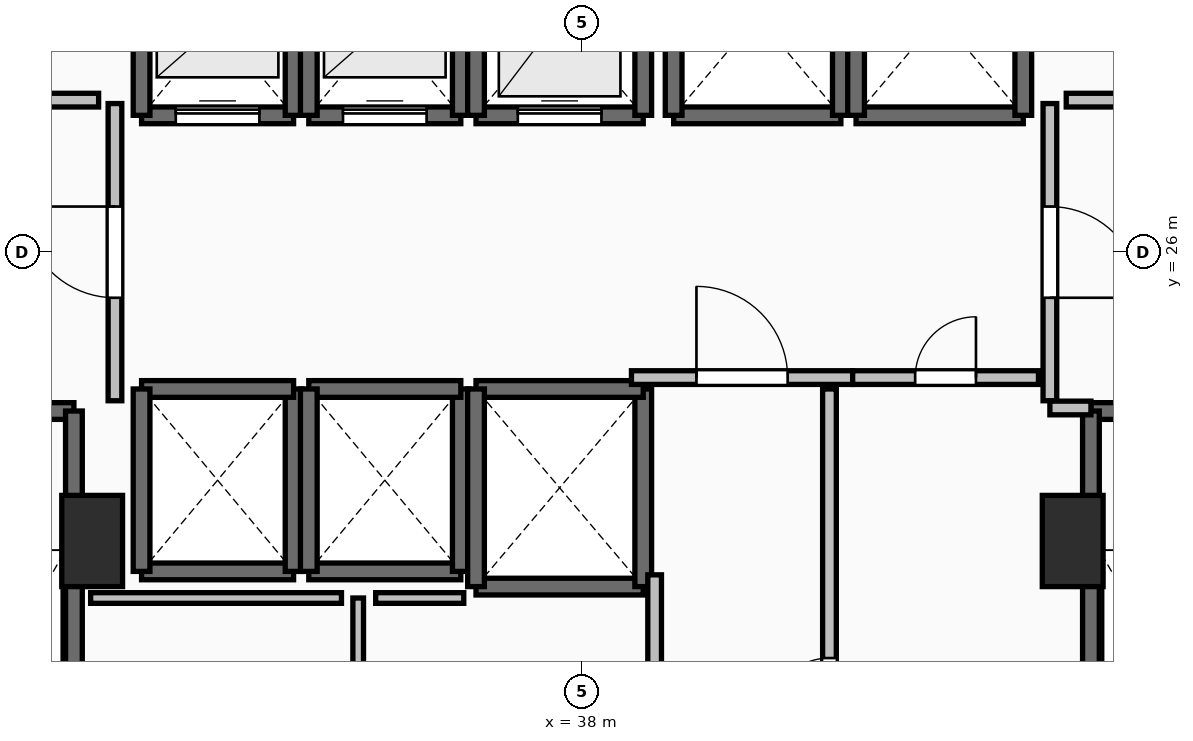
"""IFC4 building model, lengths in metres.
Left out: names, types, materials, properties, quantities, classifications, styles, units other than length and angle.
Written with IfcOpenShell. Run it as: python <this file> out.ifc"""

import sys

from ifc_helpers import new_model, si_unit, direction, frame, frame_2d, origin, origin_2d, place, context, subcontext, project, spatial, rectangle, extrude, element, fill, save


model = new_model("IFC4")
c1 = context("Model", 3, precision=1e-05, world=origin(), true_north=direction((0.0, 1.0)))
c2 = subcontext(c1, "Body", "Model", "MODEL_VIEW")
j1 = project(units=[si_unit("LENGTHUNIT", "METRE"), si_unit("PLANEANGLEUNIT", "RADIAN")], contexts=[c1])
p1 = place(None, origin())
s1 = spatial("IfcSite", under=j1, at=p1, CompositionType="ELEMENT")
p2 = place(p1, origin())
s2 = spatial("IfcBuilding", under=s1, at=p2, CompositionType="ELEMENT")
p3 = place(p2, frame((0.0, 0.0, 27.5)))
s3 = spatial("IfcBuildingStorey", under=s2, at=p3, CompositionType="ELEMENT", Elevation=27.5)
for number, where, z_axis, x_axis in (
    (1, (31.55, 22.2, 0.0), (0.0, 0.0, 1.0), (1.0, 0.0, 0.0)),
    (2, (44.45, 22.2, 0.0), (0.0, 0.0, 1.0), (1.0, 0.0, 0.0)),
):
    element("IfcColumn", number, at=place(p3, frame(where, z_axis=z_axis, x_axis=x_axis)), inside=s3, PredefinedType="PILASTER", context=c2, shape_type="SweptSolid", body=[
        extrude(rectangle(XDim=0.8, YDim=1.2, at=origin_2d()), origin(), (0.0, 0.0, 1.0), 3.5),
    ])
p4 = place(p3, frame((27.94, 23.91, 0.0), z_axis=(0.0, 0.0, 1.0), x_axis=(1.0, 0.0, 0.0)))
e3 = element("IfcWall", 3, at=p4, inside=s3, PredefinedType="SOLIDWALL", context=c2, shape_type="SweptSolid", body=[
    extrude(rectangle(XDim=3.37, YDim=0.22, at=frame_2d((1.685, 0.0))), origin(), (0.0, 0.0, 1.0), 3.24),
])
p5 = place(p4, frame((1.135, 0.0, 0.0)))
e4 = element("IfcOpeningElement", 4, at=p5, cuts=e3, PredefinedType="OPENING", context=c2, shape_type="SweptSolid", body=[
    extrude(rectangle(XDim=1.1, YDim=2.15, at=frame_2d((0.55, 1.075))), frame((0.0, 0.125, 0.0), z_axis=(0.0, -1.0, 0.0), x_axis=(1.0, 0.0, 0.0)), (0.0, 0.0, 1.0), 0.25),
])
p6 = place(p3, frame((31.31, 23.91, 0.0), z_axis=(0.0, 0.0, 1.0), x_axis=(0.0, -1.0, 0.0)))
e5 = element("IfcWall", 5, at=p6, inside=s3, PredefinedType="SOLIDWALL", context=c2, shape_type="SweptSolid", body=[
    extrude(rectangle(XDim=7.42, YDim=0.22, at=frame_2d((3.71, 0.0))), origin(), (0.0, 0.0, 1.0), 3.24),
])
p7 = place(p3, frame((44.69, 23.91, 0.0), z_axis=(0.0, 0.0, 1.0), x_axis=(1.0, 0.0, 0.0)))
e6 = element("IfcWall", 6, at=p7, inside=s3, PredefinedType="SOLIDWALL", context=c2, shape_type="SweptSolid", body=[
    extrude(rectangle(XDim=3.37, YDim=0.22, at=frame_2d((1.685, 0.0))), origin(), (0.0, 0.0, 1.0), 3.24),
])
p8 = place(p7, frame((1.135, 0.0, 0.0)))
e7 = element("IfcOpeningElement", 7, at=p8, cuts=e6, PredefinedType="OPENING", context=c2, shape_type="SweptSolid", body=[
    extrude(rectangle(XDim=1.1, YDim=2.15, at=frame_2d((0.55, 1.075))), frame((0.0, 0.125, 0.0), z_axis=(0.0, -1.0, 0.0), x_axis=(1.0, 0.0, 0.0)), (0.0, 0.0, 1.0), 0.25),
])
p9 = place(p3, frame((44.69, 16.49, 0.0), z_axis=(0.0, 0.0, 1.0), x_axis=(0.0, 1.0, 0.0)))
e8 = element("IfcWall", 8, at=p9, inside=s3, PredefinedType="SOLIDWALL", context=c2, shape_type="SweptSolid", body=[
    extrude(rectangle(XDim=7.42, YDim=0.22, at=frame_2d((3.71, 0.0))), origin(), (0.0, 0.0, 1.0), 3.24),
])
p10 = place(p3, frame((32.2, 27.8, 0.0), z_axis=(0.0, 0.0, 1.0), x_axis=(1.0, 0.0, 0.0)))
e9 = element("IfcWall", 9, at=p10, inside=s3, PredefinedType="SOLIDWALL", context=c2, shape_type="SweptSolid", body=[
    extrude(rectangle(XDim=2.0, YDim=0.22, at=frame_2d((1.0, 0.0))), origin(), (0.0, 0.0, 1.0), 3.24),
])
p11 = place(p10, frame((0.45, 0.0, 0.0)))
e10 = element("IfcOpeningElement", 10, at=p11, cuts=e9, PredefinedType="OPENING", context=c2, shape_type="SweptSolid", body=[
    extrude(rectangle(XDim=1.1, YDim=2.2, at=frame_2d((0.55, 1.1))), frame((0.0, 0.125, 0.0), z_axis=(0.0, -1.0, 0.0), x_axis=(1.0, 0.0, 0.0)), (0.0, 0.0, 1.0), 0.25),
])
for number, where, z_axis, x_axis in (
    (11, (34.2, 27.8, 0.0), (0.0, 0.0, 1.0), (0.0, 1.0, 0.0)),
    (12, (32.2, 30.2, 0.0), (0.0, 0.0, 1.0), (0.0, -1.0, 0.0)),
):
    element("IfcWall", number, at=place(p3, frame(where, z_axis=z_axis, x_axis=x_axis)), inside=s3, PredefinedType="SOLIDWALL", context=c2, shape_type="SweptSolid", body=[
        extrude(rectangle(XDim=2.4, YDim=0.22, at=frame_2d((1.2, 0.0))), origin(), (0.0, 0.0, 1.0), 3.24),
    ])
p12 = place(p3, frame((34.4, 27.8, 0.0), z_axis=(0.0, 0.0, 1.0), x_axis=(1.0, 0.0, 0.0)))
e13 = element("IfcWall", 13, at=p12, inside=s3, PredefinedType="SOLIDWALL", context=c2, shape_type="SweptSolid", body=[
    extrude(rectangle(XDim=2.0, YDim=0.22, at=frame_2d((1.0, 0.0))), origin(), (0.0, 0.0, 1.0), 3.24),
])
p13 = place(p12, frame((0.45, 0.0, 0.0)))
e14 = element("IfcOpeningElement", 14, at=p13, cuts=e13, PredefinedType="OPENING", context=c2, shape_type="SweptSolid", body=[
    extrude(rectangle(XDim=1.1, YDim=2.2, at=frame_2d((0.55, 1.1))), frame((0.0, 0.125, 0.0), z_axis=(0.0, -1.0, 0.0), x_axis=(1.0, 0.0, 0.0)), (0.0, 0.0, 1.0), 0.25),
])
for number, where, z_axis, x_axis in (
    (15, (36.4, 27.8, 0.0), (0.0, 0.0, 1.0), (0.0, 1.0, 0.0)),
    (16, (34.4, 30.2, 0.0), (0.0, 0.0, 1.0), (0.0, -1.0, 0.0)),
):
    element("IfcWall", number, at=place(p3, frame(where, z_axis=z_axis, x_axis=x_axis)), inside=s3, PredefinedType="SOLIDWALL", context=c2, shape_type="SweptSolid", body=[
        extrude(rectangle(XDim=2.4, YDim=0.22, at=frame_2d((1.2, 0.0))), origin(), (0.0, 0.0, 1.0), 3.24),
    ])
p14 = place(p3, frame((36.6, 27.8, 0.0), z_axis=(0.0, 0.0, 1.0), x_axis=(1.0, 0.0, 0.0)))
e17 = element("IfcWall", 17, at=p14, inside=s3, PredefinedType="SOLIDWALL", context=c2, shape_type="SweptSolid", body=[
    extrude(rectangle(XDim=2.2, YDim=0.22, at=frame_2d((1.1, 0.0))), origin(), (0.0, 0.0, 1.0), 3.24),
])
p15 = place(p14, frame((0.55, 0.0, 0.0)))
e18 = element("IfcOpeningElement", 18, at=p15, cuts=e17, PredefinedType="OPENING", context=c2, shape_type="SweptSolid", body=[
    extrude(rectangle(XDim=1.1, YDim=2.2, at=frame_2d((0.55, 1.1))), frame((0.0, 0.125, 0.0), z_axis=(0.0, -1.0, 0.0), x_axis=(1.0, 0.0, 0.0)), (0.0, 0.0, 1.0), 0.25),
])
for number, where, z_axis, x_axis in (
    (19, (38.8, 27.8, 0.0), (0.0, 0.0, 1.0), (0.0, 1.0, 0.0)),
    (20, (36.6, 30.4, 0.0), (0.0, 0.0, 1.0), (0.0, -1.0, 0.0)),
):
    element("IfcWall", number, at=place(p3, frame(where, z_axis=z_axis, x_axis=x_axis)), inside=s3, PredefinedType="SOLIDWALL", context=c2, shape_type="SweptSolid", body=[
        extrude(rectangle(XDim=2.6, YDim=0.22, at=frame_2d((1.3, 0.0))), origin(), (0.0, 0.0, 1.0), 3.24),
    ])
p16 = place(p3, frame((32.2, 21.8, 0.0), z_axis=(0.0, 0.0, 1.0), x_axis=(1.0, 0.0, 0.0)))
e21 = element("IfcWall", 21, at=p16, inside=s3, PredefinedType="SOLIDWALL", context=c2, shape_type="SweptSolid", body=[
    extrude(rectangle(XDim=2.0, YDim=0.22, at=frame_2d((1.0, 0.0))), origin(), (0.0, 0.0, 1.0), 3.24),
])
p17 = place(p3, frame((34.2, 21.8, 0.0), z_axis=(0.0, 0.0, 1.0), x_axis=(0.0, 1.0, 0.0)))
e22 = element("IfcWall", 22, at=p17, inside=s3, PredefinedType="SOLIDWALL", context=c2, shape_type="SweptSolid", body=[
    extrude(rectangle(XDim=2.4, YDim=0.22, at=frame_2d((1.2, 0.0))), origin(), (0.0, 0.0, 1.0), 3.24),
])
p18 = place(p3, frame((34.2, 24.2, 0.0), z_axis=(0.0, 0.0, 1.0), x_axis=(-1.0, 0.0, 0.0)))
e23 = element("IfcWall", 23, at=p18, inside=s3, PredefinedType="SOLIDWALL", context=c2, shape_type="SweptSolid", body=[
    extrude(rectangle(XDim=2.0, YDim=0.22, at=frame_2d((1.0, 0.0))), origin(), (0.0, 0.0, 1.0), 3.24),
])
p19 = place(p3, frame((32.2, 24.2, 0.0), z_axis=(0.0, 0.0, 1.0), x_axis=(0.0, -1.0, 0.0)))
e24 = element("IfcWall", 24, at=p19, inside=s3, PredefinedType="SOLIDWALL", context=c2, shape_type="SweptSolid", body=[
    extrude(rectangle(XDim=2.4, YDim=0.22, at=frame_2d((1.2, 0.0))), origin(), (0.0, 0.0, 1.0), 3.24),
])
p20 = place(p3, frame((34.4, 21.8, 0.0), z_axis=(0.0, 0.0, 1.0), x_axis=(1.0, 0.0, 0.0)))
e25 = element("IfcWall", 25, at=p20, inside=s3, PredefinedType="SOLIDWALL", context=c2, shape_type="SweptSolid", body=[
    extrude(rectangle(XDim=2.0, YDim=0.22, at=frame_2d((1.0, 0.0))), origin(), (0.0, 0.0, 1.0), 3.24),
])
p21 = place(p3, frame((36.4, 21.8, 0.0), z_axis=(0.0, 0.0, 1.0), x_axis=(0.0, 1.0, 0.0)))
e26 = element("IfcWall", 26, at=p21, inside=s3, PredefinedType="SOLIDWALL", context=c2, shape_type="SweptSolid", body=[
    extrude(rectangle(XDim=2.4, YDim=0.22, at=frame_2d((1.2, 0.0))), origin(), (0.0, 0.0, 1.0), 3.24),
])
p22 = place(p3, frame((36.4, 24.2, 0.0), z_axis=(0.0, 0.0, 1.0), x_axis=(-1.0, 0.0, 0.0)))
e27 = element("IfcWall", 27, at=p22, inside=s3, PredefinedType="SOLIDWALL", context=c2, shape_type="SweptSolid", body=[
    extrude(rectangle(XDim=2.0, YDim=0.22, at=frame_2d((1.0, 0.0))), origin(), (0.0, 0.0, 1.0), 3.24),
])
p23 = place(p3, frame((34.4, 24.2, 0.0), z_axis=(0.0, 0.0, 1.0), x_axis=(0.0, -1.0, 0.0)))
e28 = element("IfcWall", 28, at=p23, inside=s3, PredefinedType="SOLIDWALL", context=c2, shape_type="SweptSolid", body=[
    extrude(rectangle(XDim=2.4, YDim=0.22, at=frame_2d((1.2, 0.0))), origin(), (0.0, 0.0, 1.0), 3.24),
])
p24 = place(p3, frame((36.6, 21.6, 0.0), z_axis=(0.0, 0.0, 1.0), x_axis=(1.0, 0.0, 0.0)))
e29 = element("IfcWall", 29, at=p24, inside=s3, PredefinedType="SOLIDWALL", context=c2, shape_type="SweptSolid", body=[
    extrude(rectangle(XDim=2.2, YDim=0.22, at=frame_2d((1.1, 0.0))), origin(), (0.0, 0.0, 1.0), 3.24),
])
p25 = place(p3, frame((38.8, 21.6, 0.0), z_axis=(0.0, 0.0, 1.0), x_axis=(0.0, 1.0, 0.0)))
e30 = element("IfcWall", 30, at=p25, inside=s3, PredefinedType="SOLIDWALL", context=c2, shape_type="SweptSolid", body=[
    extrude(rectangle(XDim=2.6, YDim=0.22, at=frame_2d((1.3, 0.0))), origin(), (0.0, 0.0, 1.0), 3.24),
])
p26 = place(p3, frame((38.8, 24.2, 0.0), z_axis=(0.0, 0.0, 1.0), x_axis=(-1.0, 0.0, 0.0)))
e31 = element("IfcWall", 31, at=p26, inside=s3, PredefinedType="SOLIDWALL", context=c2, shape_type="SweptSolid", body=[
    extrude(rectangle(XDim=2.2, YDim=0.22, at=frame_2d((1.1, 0.0))), origin(), (0.0, 0.0, 1.0), 3.24),
])
p27 = place(p3, frame((36.6, 24.2, 0.0), z_axis=(0.0, 0.0, 1.0), x_axis=(0.0, -1.0, 0.0)))
e32 = element("IfcWall", 32, at=p27, inside=s3, PredefinedType="SOLIDWALL", context=c2, shape_type="SweptSolid", body=[
    extrude(rectangle(XDim=2.6, YDim=0.22, at=frame_2d((1.3, 0.0))), origin(), (0.0, 0.0, 1.0), 3.24),
])
p28 = place(p3, frame((39.2, 27.8, 0.0), z_axis=(0.0, 0.0, 1.0), x_axis=(1.0, 0.0, 0.0)))
e33 = element("IfcWall", 33, at=p28, inside=s3, PredefinedType="SOLIDWALL", context=c2, shape_type="SweptSolid", body=[
    extrude(rectangle(XDim=2.2, YDim=0.22, at=frame_2d((1.1, 0.0))), origin(), (0.0, 0.0, 1.0), 3.24),
])
for number, where, z_axis, x_axis in (
    (34, (41.4, 27.8, 0.0), (0.0, 0.0, 1.0), (0.0, 1.0, 0.0)),
    (35, (39.2, 30.4, 0.0), (0.0, 0.0, 1.0), (0.0, -1.0, 0.0)),
):
    element("IfcWall", number, at=place(p3, frame(where, z_axis=z_axis, x_axis=x_axis)), inside=s3, PredefinedType="SOLIDWALL", context=c2, shape_type="SweptSolid", body=[
        extrude(rectangle(XDim=2.6, YDim=0.22, at=frame_2d((1.3, 0.0))), origin(), (0.0, 0.0, 1.0), 3.24),
    ])
p29 = place(p3, frame((41.6, 27.8, 0.0), z_axis=(0.0, 0.0, 1.0), x_axis=(1.0, 0.0, 0.0)))
e36 = element("IfcWall", 36, at=p29, inside=s3, PredefinedType="SOLIDWALL", context=c2, shape_type="SweptSolid", body=[
    extrude(rectangle(XDim=2.2, YDim=0.22, at=frame_2d((1.1, 0.0))), origin(), (0.0, 0.0, 1.0), 3.24),
])
for number, where, z_axis, x_axis in (
    (37, (43.8, 27.8, 0.0), (0.0, 0.0, 1.0), (0.0, 1.0, 0.0)),
    (38, (41.6, 30.4, 0.0), (0.0, 0.0, 1.0), (0.0, -1.0, 0.0)),
):
    element("IfcWall", number, at=place(p3, frame(where, z_axis=z_axis, x_axis=x_axis)), inside=s3, PredefinedType="SOLIDWALL", context=c2, shape_type="SweptSolid", body=[
        extrude(rectangle(XDim=2.6, YDim=0.22, at=frame_2d((1.3, 0.0))), origin(), (0.0, 0.0, 1.0), 3.24),
    ])
p30 = place(p3, frame((31.85, 24.045, 0.0), z_axis=(0.0, 0.0, 1.0), x_axis=(0.0, 1.0, 0.0)))
e39 = element("IfcWall", 39, at=p30, inside=s3, PredefinedType="PARTITIONING", context=c2, shape_type="SweptSolid", body=[
    extrude(rectangle(XDim=3.91, YDim=0.18, at=frame_2d((1.955, 0.0))), origin(), (0.0, 0.0, 1.0), 3.24),
])
p31 = place(p30, frame((1.355, 0.0, 0.0)))
e40 = element("IfcOpeningElement", 40, at=p31, cuts=e39, PredefinedType="OPENING", context=c2, shape_type="SweptSolid", body=[
    extrude(rectangle(XDim=1.2, YDim=2.15, at=frame_2d((0.6, 1.075))), frame((0.0, 0.105, 0.0), z_axis=(0.0, -1.0, 0.0), x_axis=(1.0, 0.0, 0.0)), (0.0, 0.0, 1.0), 0.21),
])
p32 = place(p3, frame((44.15, 27.955, 0.0), z_axis=(0.0, 0.0, 1.0), x_axis=(0.0, -1.0, 0.0)))
e41 = element("IfcWall", 41, at=p32, inside=s3, PredefinedType="PARTITIONING", context=c2, shape_type="SweptSolid", body=[
    extrude(rectangle(XDim=3.91, YDim=0.18, at=frame_2d((1.955, 0.0))), origin(), (0.0, 0.0, 1.0), 3.24),
])
p33 = place(p32, frame((1.355, 0.0, 0.0)))
e42 = element("IfcOpeningElement", 42, at=p33, cuts=e41, PredefinedType="OPENING", context=c2, shape_type="SweptSolid", body=[
    extrude(rectangle(XDim=1.2, YDim=2.15, at=frame_2d((0.6, 1.075))), frame((0.0, 0.105, 0.0), z_axis=(0.0, -1.0, 0.0), x_axis=(1.0, 0.0, 0.0)), (0.0, 0.0, 1.0), 0.21),
])
p34 = place(p3, frame((44.15, 23.95, 0.0), z_axis=(0.0, 0.0, 1.0), x_axis=(1.0, 0.0, 0.0)))
e43 = element("IfcWall", 43, at=p34, inside=s3, PredefinedType="PARTITIONING", context=c2, shape_type="SweptSolid", body=[
    extrude(rectangle(XDim=0.54, YDim=0.18, at=frame_2d((0.27, 0.0))), origin(), (0.0, 0.0, 1.0), 3.24),
])
p35 = place(p3, frame((38.645, 24.35, 0.0), z_axis=(0.0, 0.0, 1.0), x_axis=(1.0, 0.0, 0.0)))
e44 = element("IfcWall", 44, at=p35, inside=s3, PredefinedType="PARTITIONING", context=c2, shape_type="SweptSolid", body=[
    extrude(rectangle(XDim=2.91, YDim=0.18, at=frame_2d((1.455, 0.0))), origin(), (0.0, 0.0, 1.0), 3.24),
])
p36 = place(p35, frame((0.855, 0.0, 0.0)))
e45 = element("IfcOpeningElement", 45, at=p36, cuts=e44, PredefinedType="OPENING", context=c2, shape_type="SweptSolid", body=[
    extrude(rectangle(XDim=1.2, YDim=2.15, at=frame_2d((0.6, 1.075))), frame((0.0, 0.105, 0.0), z_axis=(0.0, -1.0, 0.0), x_axis=(1.0, 0.0, 0.0)), (0.0, 0.0, 1.0), 0.21),
])
p37 = place(p3, frame((41.555, 24.35, 0.0), z_axis=(0.0, 0.0, 1.0), x_axis=(1.0, 0.0, 0.0)))
e46 = element("IfcWall", 46, at=p37, inside=s3, PredefinedType="PARTITIONING", context=c2, shape_type="SweptSolid", body=[
    extrude(rectangle(XDim=2.445, YDim=0.18, at=frame_2d((1.223, 0.0))), origin(), (0.0, 0.0, 1.0), 3.24),
])
p38 = place(p37, frame((0.823, 0.0, 0.0)))
e47 = element("IfcOpeningElement", 47, at=p38, cuts=e46, PredefinedType="OPENING", context=c2, shape_type="SweptSolid", body=[
    extrude(rectangle(XDim=0.8, YDim=2.05, at=frame_2d((0.4, 1.025))), frame((0.0, 0.105, 0.0), z_axis=(0.0, -1.0, 0.0), x_axis=(1.0, 0.0, 0.0)), (0.0, 0.0, 1.0), 0.21),
])
p39 = place(p3, frame((41.25, 16.32, 0.0), z_axis=(0.0, 0.0, 1.0), x_axis=(0.0, 1.0, 0.0)))
e48 = element("IfcWall", 48, at=p39, inside=s3, PredefinedType="PARTITIONING", context=c2, shape_type="SweptSolid", body=[
    extrude(rectangle(XDim=7.88, YDim=0.18, at=frame_2d((3.94, 0.0))), origin(), (0.0, 0.0, 1.0), 3.24),
])
p40 = place(p39, frame((3.54, 0.0, 0.0)))
e49 = element("IfcOpeningElement", 49, at=p40, cuts=e48, PredefinedType="OPENING", context=c2, shape_type="SweptSolid", body=[
    extrude(rectangle(XDim=0.8, YDim=2.05, at=frame_2d((0.4, 1.025))), frame((0.0, 0.105, 0.0), z_axis=(0.0, -1.0, 0.0), x_axis=(1.0, 0.0, 0.0)), (0.0, 0.0, 1.0), 0.21),
])
p41 = place(p3, frame((38.95, 21.755, 0.0), z_axis=(0.0, 0.0, 1.0), x_axis=(0.0, -1.0, 0.0)))
e50 = element("IfcWall", 50, at=p41, inside=s3, PredefinedType="PARTITIONING", context=c2, shape_type="SweptSolid", body=[
    extrude(rectangle(XDim=5.435, YDim=0.18, at=frame_2d((2.717, 0.0))), origin(), (0.0, 0.0, 1.0), 3.24),
])
p42 = place(p41, frame((2.292, 0.0, 0.0)))
e51 = element("IfcOpeningElement", 51, at=p42, cuts=e50, PredefinedType="OPENING", context=c2, shape_type="SweptSolid", body=[
    extrude(rectangle(XDim=0.85, YDim=2.1, at=frame_2d((0.425, 1.05))), frame((0.0, 0.105, 0.0), z_axis=(0.0, -1.0, 0.0), x_axis=(1.0, 0.0, 0.0)), (0.0, 0.0, 1.0), 0.21),
])
p43 = place(p3, frame((35.05, 16.32, 0.0), z_axis=(0.0, 0.0, 1.0), x_axis=(0.0, 1.0, 0.0)))
e52 = element("IfcWall", 52, at=p43, inside=s3, PredefinedType="PARTITIONING", context=c2, shape_type="SweptSolid", body=[
    extrude(rectangle(XDim=5.13, YDim=0.14, at=frame_2d((2.565, 0.0))), origin(), (0.0, 0.0, 1.0), 3.24),
])
for number, where, z_axis, x_axis in (
    (53, (31.635, 28.0, 0.0), (0.0, 0.0, 1.0), (-1.0, 0.0, 0.0)),
    (54, (45.28, 28.0, 0.0), (0.0, 0.0, 1.0), (-1.0, 0.0, 0.0)),
):
    element("IfcWall", number, at=place(p3, frame(where, z_axis=z_axis, x_axis=x_axis)), inside=s3, PredefinedType="PARTITIONING", context=c2, shape_type="SweptSolid", body=[
        extrude(rectangle(XDim=0.915, YDim=0.18, at=frame_2d((0.458, 0.0))), origin(), (0.0, 0.0, 1.0), 3.24),
    ])
p44 = place(p3, frame((34.83, 21.45, 0.0), z_axis=(0.0, 0.0, 1.0), x_axis=(-1.0, 0.0, 0.0)))
e55 = element("IfcWall", 55, at=p44, inside=s3, PredefinedType="PARTITIONING", context=c2, shape_type="SweptSolid", body=[
    extrude(rectangle(XDim=3.3, YDim=0.14, at=frame_2d((1.65, 0.0))), origin(), (0.0, 0.0, 1.0), 3.24),
])
p45 = place(p3, frame((36.439, 21.45, 0.0), z_axis=(0.0, 0.0, 1.0), x_axis=(-1.0, 0.0, 0.0)))
e56 = element("IfcWall", 56, at=p45, inside=s3, PredefinedType="PARTITIONING", context=c2, shape_type="SweptSolid", body=[
    extrude(rectangle(XDim=1.159, YDim=0.14, at=frame_2d((0.58, 0.0))), origin(), (0.0, 0.0, 1.0), 3.24),
])
p46 = place(p11, origin())
e57 = element("IfcDoor", 57, at=p46, inside=s3, OperationType="SLIDING_TO_LEFT", PredefinedType="DOOR", context=c2, shape_type="SweptSolid", body=[
    extrude(rectangle(XDim=1.1, YDim=2.2, at=frame_2d((0.55, 1.1))), frame((0.0, 0.025, 0.0), z_axis=(0.0, -1.0, 0.0), x_axis=(1.0, 0.0, 0.0)), (0.0, 0.0, 1.0), 0.05),
])
fill(e10, e57)
p47 = place(p13, origin())
e58 = element("IfcDoor", 58, at=p47, inside=s3, OperationType="SLIDING_TO_LEFT", PredefinedType="DOOR", context=c2, shape_type="SweptSolid", body=[
    extrude(rectangle(XDim=1.1, YDim=2.2, at=frame_2d((0.55, 1.1))), frame((0.0, 0.025, 0.0), z_axis=(0.0, -1.0, 0.0), x_axis=(1.0, 0.0, 0.0)), (0.0, 0.0, 1.0), 0.05),
])
fill(e14, e58)
p48 = place(p15, origin())
e59 = element("IfcDoor", 59, at=p48, inside=s3, OperationType="SLIDING_TO_LEFT", PredefinedType="DOOR", context=c2, shape_type="SweptSolid", body=[
    extrude(rectangle(XDim=1.1, YDim=2.2, at=frame_2d((0.55, 1.1))), frame((0.0, 0.025, 0.0), z_axis=(0.0, -1.0, 0.0), x_axis=(1.0, 0.0, 0.0)), (0.0, 0.0, 1.0), 0.05),
])
fill(e18, e59)
p49 = place(p31, origin())
e60 = element("IfcDoor", 60, at=p49, inside=s3, OperationType="SINGLE_SWING_RIGHT", PredefinedType="DOOR", context=c2, shape_type="SweptSolid", body=[
    extrude(rectangle(XDim=1.2, YDim=2.15, at=frame_2d((0.6, 1.075))), frame((0.0, 0.025, 0.0), z_axis=(0.0, -1.0, 0.0), x_axis=(1.0, 0.0, 0.0)), (0.0, 0.0, 1.0), 0.05),
])
fill(e40, e60)
p50 = place(p33, origin())
e61 = element("IfcDoor", 61, at=p50, inside=s3, OperationType="SINGLE_SWING_RIGHT", PredefinedType="DOOR", context=c2, shape_type="SweptSolid", body=[
    extrude(rectangle(XDim=1.2, YDim=2.15, at=frame_2d((0.6, 1.075))), frame((0.0, 0.025, 0.0), z_axis=(0.0, -1.0, 0.0), x_axis=(1.0, 0.0, 0.0)), (0.0, 0.0, 1.0), 0.05),
])
fill(e42, e61)
p51 = place(p36, origin())
e62 = element("IfcDoor", 62, at=p51, inside=s3, OperationType="SINGLE_SWING_LEFT", PredefinedType="DOOR", context=c2, shape_type="SweptSolid", body=[
    extrude(rectangle(XDim=1.2, YDim=2.15, at=frame_2d((0.6, 1.075))), frame((0.0, 0.025, 0.0), z_axis=(0.0, -1.0, 0.0), x_axis=(1.0, 0.0, 0.0)), (0.0, 0.0, 1.0), 0.05),
])
fill(e45, e62)
p52 = place(p38, origin())
e63 = element("IfcDoor", 63, at=p52, inside=s3, OperationType="SINGLE_SWING_RIGHT", PredefinedType="DOOR", context=c2, shape_type="SweptSolid", body=[
    extrude(rectangle(XDim=0.8, YDim=2.05, at=frame_2d((0.4, 1.025))), frame((0.0, 0.025, 0.0), z_axis=(0.0, -1.0, 0.0), x_axis=(1.0, 0.0, 0.0)), (0.0, 0.0, 1.0), 0.05),
])
fill(e47, e63)
p53 = place(p40, origin())
e64 = element("IfcDoor", 64, at=p53, inside=s3, OperationType="SINGLE_SWING_LEFT", PredefinedType="DOOR", context=c2, shape_type="SweptSolid", body=[
    extrude(rectangle(XDim=0.8, YDim=2.05, at=frame_2d((0.4, 1.025))), frame((0.0, 0.025, 0.0), z_axis=(0.0, -1.0, 0.0), x_axis=(1.0, 0.0, 0.0)), (0.0, 0.0, 1.0), 0.05),
])
fill(e49, e64)
save(model, sys.argv[1])
